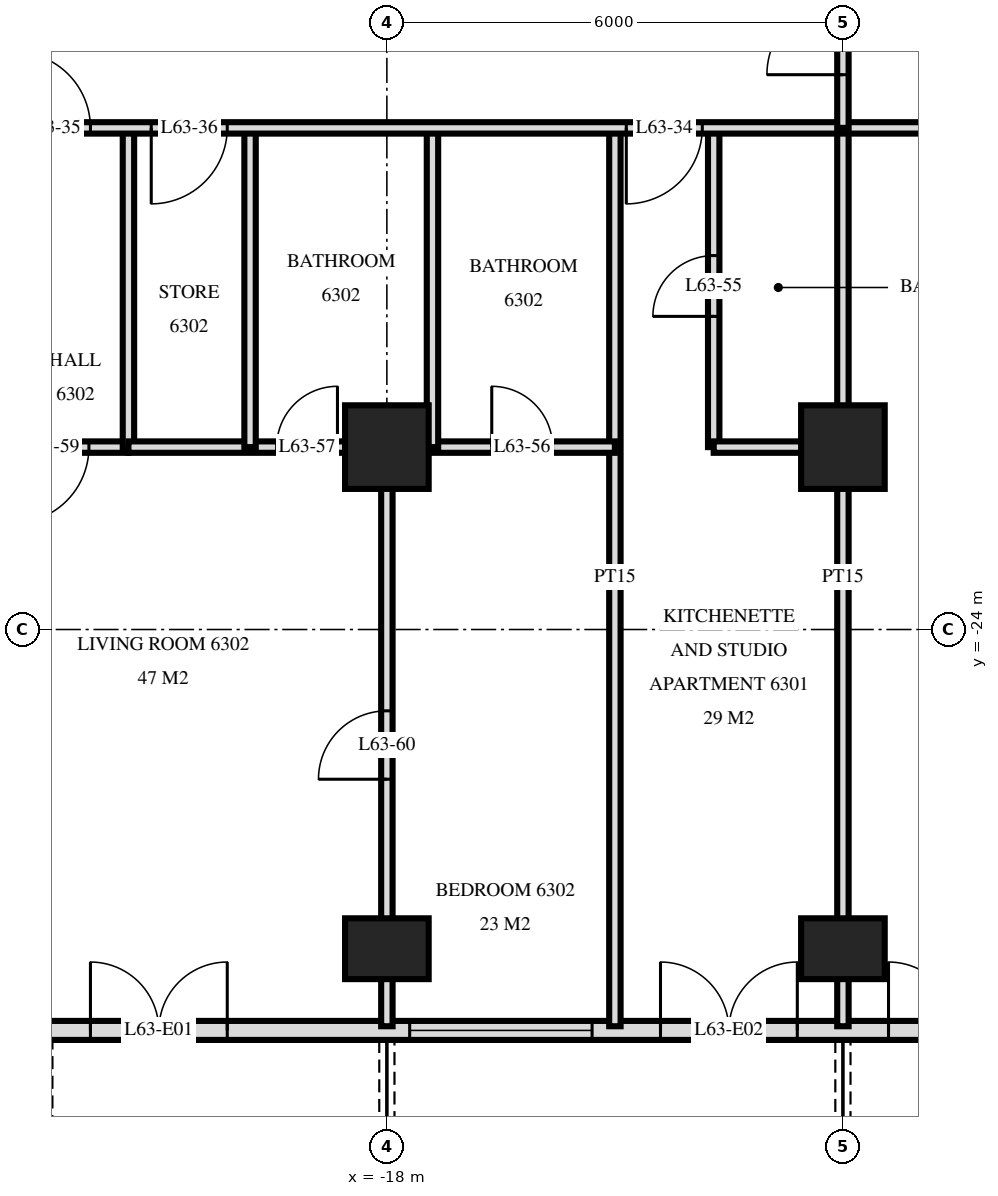
"""IFC4 building model, lengths in metres.
Left out: names, types, materials, properties, quantities, classifications, styles, units other than length and angle.
Written with IfcOpenShell. Run it as: python <this file> out.ifc"""

import sys

from ifc_helpers import new_model, si_unit, direction, frame, frame_2d, origin, origin_2d, place, context, subcontext, project, spatial, rectangle, extrude, element, fill, save


model = new_model("IFC4")
c1 = context("Model", 3, precision=1e-05, world=origin(), true_north=direction((0.0, 1.0)))
c2 = subcontext(c1, "Body", "Model", "MODEL_VIEW")
j1 = project(units=[si_unit("LENGTHUNIT", "METRE"), si_unit("PLANEANGLEUNIT", "RADIAN")], contexts=[c1])
p1 = place(None, origin())
s1 = spatial("IfcSite", under=j1, at=p1, CompositionType="ELEMENT")
p2 = place(p1, origin())
s2 = spatial("IfcBuilding", under=s1, at=p2, CompositionType="ELEMENT")
p3 = place(p2, frame((0.0, 0.0, 239.6)))
s3 = spatial("IfcBuildingStorey", under=s2, at=p3, CompositionType="ELEMENT", Elevation=239.6)
p4 = place(p3, frame((-18.0, -28.2, 0.0), z_axis=(0.0, 0.0, 1.0), x_axis=(1.0, 0.0, 0.0)))
e1 = element("IfcColumn", 1, at=p4, inside=s3, PredefinedType="COLUMN", context=c2, shape_type="SweptSolid", body=[
    extrude(rectangle(XDim=1.1, YDim=0.8, at=origin_2d()), origin(), (0.0, 0.0, 1.0), 3.5),
])
p5 = place(p3, frame((-18.0, -21.6, 0.0), z_axis=(0.0, 0.0, 1.0), x_axis=(1.0, 0.0, 0.0)))
e2 = element("IfcColumn", 2, at=p5, inside=s3, PredefinedType="COLUMN", context=c2, shape_type="SweptSolid", body=[
    extrude(rectangle(XDim=1.1, YDim=1.1, at=origin_2d()), origin(), (0.0, 0.0, 1.0), 3.5),
])
p6 = place(p3, frame((-12.0, -28.2, 0.0), z_axis=(0.0, 0.0, 1.0), x_axis=(1.0, 0.0, 0.0)))
e3 = element("IfcColumn", 3, at=p6, inside=s3, PredefinedType="COLUMN", context=c2, shape_type="SweptSolid", body=[
    extrude(rectangle(XDim=1.1, YDim=0.8, at=origin_2d()), origin(), (0.0, 0.0, 1.0), 3.5),
])
p7 = place(p3, frame((-12.0, -21.6, 0.0), z_axis=(0.0, 0.0, 1.0), x_axis=(1.0, 0.0, 0.0)))
e4 = element("IfcColumn", 4, at=p7, inside=s3, PredefinedType="COLUMN", context=c2, shape_type="SweptSolid", body=[
    extrude(rectangle(XDim=1.1, YDim=1.1, at=origin_2d()), origin(), (0.0, 0.0, 1.0), 3.5),
])
p8 = place(p3, frame((-22.475, -29.275, 0.0), z_axis=(0.0, 0.0, 1.0), x_axis=(1.0, 0.0, 0.0)))
e5 = element("IfcWall", 5, at=p8, inside=s3, PredefinedType="SOLIDWALL", context=c2, shape_type="SweptSolid", body=[
    extrude(rectangle(XDim=44.951, YDim=0.25, at=frame_2d((22.475, 0.0))), origin(), (0.0, 0.0, 1.0), 3.22),
])
p9 = place(p8, frame((0.575, 0.0, 0.0)))
e6 = element("IfcOpeningElement", 6, at=p9, cuts=e5, PredefinedType="OPENING", context=c2, shape_type="SweptSolid", body=[
    extrude(rectangle(XDim=1.8, YDim=2.4, at=frame_2d((0.9, 1.2))), frame((0.0, 0.135, 0.0), z_axis=(0.0, -1.0, 0.0), x_axis=(1.0, 0.0, 0.0)), (0.0, 0.0, 1.0), 0.27),
])
p10 = place(p8, frame((4.775, 0.0, 0.9)))
e7 = element("IfcOpeningElement", 7, at=p10, cuts=e5, PredefinedType="OPENING", context=c2, shape_type="SweptSolid", body=[
    extrude(rectangle(XDim=2.4, YDim=1.5, at=frame_2d((1.2, 0.75))), frame((0.0, 0.135, 0.0), z_axis=(0.0, -1.0, 0.0), x_axis=(1.0, 0.0, 0.0)), (0.0, 0.0, 1.0), 0.27),
])
p11 = place(p8, frame((8.075, 0.0, 0.0)))
e8 = element("IfcOpeningElement", 8, at=p11, cuts=e5, PredefinedType="OPENING", context=c2, shape_type="SweptSolid", body=[
    extrude(rectangle(XDim=1.8, YDim=2.4, at=frame_2d((0.9, 1.2))), frame((0.0, 0.135, 0.0), z_axis=(0.0, -1.0, 0.0), x_axis=(1.0, 0.0, 0.0)), (0.0, 0.0, 1.0), 0.27),
])
p12 = place(p8, frame((11.075, 0.0, 0.0)))
e9 = element("IfcOpeningElement", 9, at=p12, cuts=e5, PredefinedType="OPENING", context=c2, shape_type="SweptSolid", body=[
    extrude(rectangle(XDim=1.8, YDim=2.4, at=frame_2d((0.9, 1.2))), frame((0.0, 0.135, 0.0), z_axis=(0.0, -1.0, 0.0), x_axis=(1.0, 0.0, 0.0)), (0.0, 0.0, 1.0), 0.27),
])
p13 = place(p8, frame((13.775, 0.0, 0.9)))
e10 = element("IfcOpeningElement", 10, at=p13, cuts=e5, PredefinedType="OPENING", context=c2, shape_type="SweptSolid", body=[
    extrude(rectangle(XDim=2.4, YDim=1.5, at=frame_2d((1.2, 0.75))), frame((0.0, 0.135, 0.0), z_axis=(0.0, -1.0, 0.0), x_axis=(1.0, 0.0, 0.0)), (0.0, 0.0, 1.0), 0.27),
])
p14 = place(p8, frame((16.775, 0.0, 0.9)))
e11 = element("IfcOpeningElement", 11, at=p14, cuts=e5, PredefinedType="OPENING", context=c2, shape_type="SweptSolid", body=[
    extrude(rectangle(XDim=2.4, YDim=1.5, at=frame_2d((1.2, 0.75))), frame((0.0, 0.135, 0.0), z_axis=(0.0, -1.0, 0.0), x_axis=(1.0, 0.0, 0.0)), (0.0, 0.0, 1.0), 0.27),
])
p15 = place(p8, frame((20.075, 0.0, 0.0)))
e12 = element("IfcOpeningElement", 12, at=p15, cuts=e5, PredefinedType="OPENING", context=c2, shape_type="SweptSolid", body=[
    extrude(rectangle(XDim=1.8, YDim=2.4, at=frame_2d((0.9, 1.2))), frame((0.0, 0.135, 0.0), z_axis=(0.0, -1.0, 0.0), x_axis=(1.0, 0.0, 0.0)), (0.0, 0.0, 1.0), 0.27),
])
p16 = place(p8, frame((23.075, 0.0, 0.0)))
e13 = element("IfcOpeningElement", 13, at=p16, cuts=e5, PredefinedType="OPENING", context=c2, shape_type="SweptSolid", body=[
    extrude(rectangle(XDim=1.8, YDim=2.4, at=frame_2d((0.9, 1.2))), frame((0.0, 0.135, 0.0), z_axis=(0.0, -1.0, 0.0), x_axis=(1.0, 0.0, 0.0)), (0.0, 0.0, 1.0), 0.27),
])
p17 = place(p8, frame((25.775, 0.0, 0.9)))
e14 = element("IfcOpeningElement", 14, at=p17, cuts=e5, PredefinedType="OPENING", context=c2, shape_type="SweptSolid", body=[
    extrude(rectangle(XDim=2.4, YDim=1.5, at=frame_2d((1.2, 0.75))), frame((0.0, 0.135, 0.0), z_axis=(0.0, -1.0, 0.0), x_axis=(1.0, 0.0, 0.0)), (0.0, 0.0, 1.0), 0.27),
])
p18 = place(p8, frame((29.075, 0.0, 0.0)))
e15 = element("IfcOpeningElement", 15, at=p18, cuts=e5, PredefinedType="OPENING", context=c2, shape_type="SweptSolid", body=[
    extrude(rectangle(XDim=1.8, YDim=2.4, at=frame_2d((0.9, 1.2))), frame((0.0, 0.135, 0.0), z_axis=(0.0, -1.0, 0.0), x_axis=(1.0, 0.0, 0.0)), (0.0, 0.0, 1.0), 0.27),
])
p19 = place(p8, frame((31.775, 0.0, 0.9)))
e16 = element("IfcOpeningElement", 16, at=p19, cuts=e5, PredefinedType="OPENING", context=c2, shape_type="SweptSolid", body=[
    extrude(rectangle(XDim=2.4, YDim=1.5, at=frame_2d((1.2, 0.75))), frame((0.0, 0.135, 0.0), z_axis=(0.0, -1.0, 0.0), x_axis=(1.0, 0.0, 0.0)), (0.0, 0.0, 1.0), 0.27),
])
p20 = place(p8, frame((35.075, 0.0, 0.0)))
e17 = element("IfcOpeningElement", 17, at=p20, cuts=e5, PredefinedType="OPENING", context=c2, shape_type="SweptSolid", body=[
    extrude(rectangle(XDim=1.8, YDim=2.4, at=frame_2d((0.9, 1.2))), frame((0.0, 0.135, 0.0), z_axis=(0.0, -1.0, 0.0), x_axis=(1.0, 0.0, 0.0)), (0.0, 0.0, 1.0), 0.27),
])
p21 = place(p8, frame((41.075, 0.0, 0.0)))
e18 = element("IfcOpeningElement", 18, at=p21, cuts=e5, PredefinedType="OPENING", context=c2, shape_type="SweptSolid", body=[
    extrude(rectangle(XDim=1.8, YDim=2.4, at=frame_2d((0.9, 1.2))), frame((0.0, 0.135, 0.0), z_axis=(0.0, -1.0, 0.0), x_axis=(1.0, 0.0, 0.0)), (0.0, 0.0, 1.0), 0.27),
])
p22 = place(p3, frame((-12.0, -17.4, 0.0), z_axis=(0.0, 0.0, 1.0), x_axis=(0.0, 1.0, 0.0)))
e19 = element("IfcWall", 19, at=p22, inside=s3, PredefinedType="PARTITIONING", context=c2, shape_type="SweptSolid", body=[
    extrude(rectangle(XDim=2.35, YDim=0.15, at=frame_2d((1.175, 0.0))), origin(), (0.0, 0.0, 1.0), 3.22),
])
p23 = place(p22, frame((0.7, 0.0, 0.0)))
e20 = element("IfcOpeningElement", 20, at=p23, cuts=e19, PredefinedType="OPENING", context=c2, shape_type="SweptSolid", body=[
    extrude(rectangle(XDim=1.0, YDim=2.1, at=frame_2d((0.5, 1.05))), frame((0.0, 0.085, 0.0), z_axis=(0.0, -1.0, 0.0), x_axis=(1.0, 0.0, 0.0)), (0.0, 0.0, 1.0), 0.17),
])
p24 = place(p3, frame((-12.0, -29.22, 0.0), z_axis=(0.0, 0.0, 1.0), x_axis=(0.0, 1.0, 0.0)))
e21 = element("IfcWall", 21, at=p24, inside=s3, PredefinedType="PARTITIONING", context=c2, shape_type="SweptSolid", body=[
    extrude(rectangle(XDim=11.82, YDim=0.15, at=frame_2d((5.91, 0.0))), origin(), (0.0, 0.0, 1.0), 3.22),
])
p25 = place(p3, frame((-13.7, -21.6, 0.0), z_axis=(0.0, 0.0, 1.0), x_axis=(0.0, 1.0, 0.0)))
e22 = element("IfcWall", 22, at=p25, inside=s3, PredefinedType="PARTITIONING", context=c2, shape_type="SweptSolid", body=[
    extrude(rectangle(XDim=4.2, YDim=0.15, at=frame_2d((2.1, 0.0))), origin(), (0.0, 0.0, 1.0), 3.22),
])
p26 = place(p25, frame((1.72, 0.0, 0.0)))
e23 = element("IfcOpeningElement", 23, at=p26, cuts=e22, PredefinedType="OPENING", context=c2, shape_type="SweptSolid", body=[
    extrude(rectangle(XDim=0.8, YDim=2.1, at=frame_2d((0.4, 1.05))), frame((0.0, 0.085, 0.0), z_axis=(0.0, -1.0, 0.0), x_axis=(1.0, 0.0, 0.0)), (0.0, 0.0, 1.0), 0.17),
])
p27 = place(p3, frame((-15.0, -29.22, 0.0), z_axis=(0.0, 0.0, 1.0), x_axis=(0.0, 1.0, 0.0)))
e24 = element("IfcWall", 24, at=p27, inside=s3, PredefinedType="PARTITIONING", context=c2, shape_type="SweptSolid", body=[
    extrude(rectangle(XDim=11.82, YDim=0.15, at=frame_2d((5.91, 0.0))), origin(), (0.0, 0.0, 1.0), 3.22),
])
p28 = place(p3, frame((-17.4, -21.6, 0.0), z_axis=(0.0, 0.0, 1.0), x_axis=(0.0, 1.0, 0.0)))
e25 = element("IfcWall", 25, at=p28, inside=s3, PredefinedType="PARTITIONING", context=c2, shape_type="SweptSolid", body=[
    extrude(rectangle(XDim=4.2, YDim=0.15, at=frame_2d((2.1, 0.0))), origin(), (0.0, 0.0, 1.0), 3.22),
])
p29 = place(p3, frame((-18.0, -29.22, 0.0), z_axis=(0.0, 0.0, 1.0), x_axis=(0.0, 1.0, 0.0)))
e26 = element("IfcWall", 26, at=p29, inside=s3, PredefinedType="PARTITIONING", context=c2, shape_type="SweptSolid", body=[
    extrude(rectangle(XDim=7.62, YDim=0.15, at=frame_2d((3.81, 0.0))), origin(), (0.0, 0.0, 1.0), 3.22),
])
p30 = place(p29, frame((3.25, 0.0, 0.0)))
e27 = element("IfcOpeningElement", 27, at=p30, cuts=e26, PredefinedType="OPENING", context=c2, shape_type="SweptSolid", body=[
    extrude(rectangle(XDim=0.9, YDim=2.1, at=frame_2d((0.45, 1.05))), frame((0.0, 0.085, 0.0), z_axis=(0.0, -1.0, 0.0), x_axis=(1.0, 0.0, 0.0)), (0.0, 0.0, 1.0), 0.17),
])
for number, where, z_axis, x_axis in (
    (28, (-19.8, -21.6, 0.0), (0.0, 0.0, 1.0), (0.0, 1.0, 0.0)),
    (29, (-21.4, -21.6, 0.0), (0.0, 0.0, 1.0), (0.0, 1.0, 0.0)),
):
    element("IfcWall", number, at=place(p3, frame(where, z_axis=z_axis, x_axis=x_axis)), inside=s3, PredefinedType="PARTITIONING", context=c2, shape_type="SweptSolid", body=[
        extrude(rectangle(XDim=4.2, YDim=0.15, at=frame_2d((2.1, 0.0))), origin(), (0.0, 0.0, 1.0), 3.22),
    ])
p31 = place(p3, frame((-23.4, -21.6, 0.0), z_axis=(0.0, 0.0, 1.0), x_axis=(1.0, 0.0, 0.0)))
e30 = element("IfcWall", 30, at=p31, inside=s3, PredefinedType="PARTITIONING", context=c2, shape_type="SweptSolid", body=[
    extrude(rectangle(XDim=2.0, YDim=0.15, at=frame_2d((1.0, 0.0))), origin(), (0.0, 0.0, 1.0), 3.22),
])
p32 = place(p31, frame((0.48, 0.0, 0.0)))
e31 = element("IfcOpeningElement", 31, at=p32, cuts=e30, PredefinedType="OPENING", context=c2, shape_type="SweptSolid", body=[
    extrude(rectangle(XDim=1.0, YDim=2.1, at=frame_2d((0.5, 1.05))), frame((0.0, 0.085, 0.0), z_axis=(0.0, -1.0, 0.0), x_axis=(1.0, 0.0, 0.0)), (0.0, 0.0, 1.0), 0.17),
])
p33 = place(p3, frame((-21.4, -21.6, 0.0), z_axis=(0.0, 0.0, 1.0), x_axis=(1.0, 0.0, 0.0)))
e32 = element("IfcWall", 32, at=p33, inside=s3, PredefinedType="PARTITIONING", context=c2, shape_type="SweptSolid", body=[
    extrude(rectangle(XDim=6.4, YDim=0.15, at=frame_2d((3.2, 0.0))), origin(), (0.0, 0.0, 1.0), 3.22),
])
p34 = place(p33, frame((4.78, 0.0, 0.0)))
e33 = element("IfcOpeningElement", 33, at=p34, cuts=e32, PredefinedType="OPENING", context=c2, shape_type="SweptSolid", body=[
    extrude(rectangle(XDim=0.8, YDim=2.1, at=frame_2d((0.4, 1.05))), frame((0.0, 0.085, 0.0), z_axis=(0.0, -1.0, 0.0), x_axis=(1.0, 0.0, 0.0)), (0.0, 0.0, 1.0), 0.17),
])
p35 = place(p33, frame((1.95, 0.0, 0.0)))
e34 = element("IfcOpeningElement", 34, at=p35, cuts=e32, PredefinedType="OPENING", context=c2, shape_type="SweptSolid", body=[
    extrude(rectangle(XDim=0.8, YDim=2.1, at=frame_2d((0.4, 1.05))), frame((0.0, 0.085, 0.0), z_axis=(0.0, -1.0, 0.0), x_axis=(1.0, 0.0, 0.0)), (0.0, 0.0, 1.0), 0.17),
])
p36 = place(p3, frame((-13.7, -21.6, 0.0), z_axis=(0.0, 0.0, 1.0), x_axis=(1.0, 0.0, 0.0)))
e35 = element("IfcWall", 35, at=p36, inside=s3, PredefinedType="PARTITIONING", context=c2, shape_type="SweptSolid", body=[
    extrude(rectangle(XDim=1.7, YDim=0.15, at=frame_2d((0.85, 0.0))), origin(), (0.0, 0.0, 1.0), 3.22),
])
p37 = place(p3, frame((-26.82, -17.4, 0.0), z_axis=(0.0, 0.0, 1.0), x_axis=(1.0, 0.0, 0.0)))
e36 = element("IfcWall", 36, at=p37, inside=s3, PredefinedType="PARTITIONING", context=c2, shape_type="SweptSolid", body=[
    extrude(rectangle(XDim=53.64, YDim=0.15, at=frame_2d((26.82, 0.0))), origin(), (0.0, 0.0, 1.0), 3.22),
])
p38 = place(p37, frame((11.97, 0.0, 0.0)))
e37 = element("IfcOpeningElement", 37, at=p38, cuts=e36, PredefinedType="OPENING", context=c2, shape_type="SweptSolid", body=[
    extrude(rectangle(XDim=1.0, YDim=2.1, at=frame_2d((0.5, 1.05))), frame((0.0, 0.085, 0.0), z_axis=(0.0, -1.0, 0.0), x_axis=(1.0, 0.0, 0.0)), (0.0, 0.0, 1.0), 0.17),
])
p39 = place(p37, frame((3.92, 0.0, 0.0)))
e38 = element("IfcOpeningElement", 38, at=p39, cuts=e36, PredefinedType="OPENING", context=c2, shape_type="SweptSolid", body=[
    extrude(rectangle(XDim=1.0, YDim=2.1, at=frame_2d((0.5, 1.05))), frame((0.0, 0.085, 0.0), z_axis=(0.0, -1.0, 0.0), x_axis=(1.0, 0.0, 0.0)), (0.0, 0.0, 1.0), 0.17),
])
p40 = place(p37, frame((5.72, 0.0, 0.0)))
e39 = element("IfcOpeningElement", 39, at=p40, cuts=e36, PredefinedType="OPENING", context=c2, shape_type="SweptSolid", body=[
    extrude(rectangle(XDim=1.0, YDim=2.1, at=frame_2d((0.5, 1.05))), frame((0.0, 0.085, 0.0), z_axis=(0.0, -1.0, 0.0), x_axis=(1.0, 0.0, 0.0)), (0.0, 0.0, 1.0), 0.17),
])
p41 = place(p37, frame((47.72, 0.0, 0.0)))
e40 = element("IfcOpeningElement", 40, at=p41, cuts=e36, PredefinedType="OPENING", context=c2, shape_type="SweptSolid", body=[
    extrude(rectangle(XDim=1.0, YDim=2.1, at=frame_2d((0.5, 1.05))), frame((0.0, 0.085, 0.0), z_axis=(0.0, -1.0, 0.0), x_axis=(1.0, 0.0, 0.0)), (0.0, 0.0, 1.0), 0.17),
])
p42 = place(p37, frame((51.02, 0.0, 0.0)))
e41 = element("IfcOpeningElement", 41, at=p42, cuts=e36, PredefinedType="OPENING", context=c2, shape_type="SweptSolid", body=[
    extrude(rectangle(XDim=1.0, YDim=2.1, at=frame_2d((0.5, 1.05))), frame((0.0, 0.085, 0.0), z_axis=(0.0, -1.0, 0.0), x_axis=(1.0, 0.0, 0.0)), (0.0, 0.0, 1.0), 0.17),
])
p43 = place(p37, frame((17.32, 0.0, 0.0)))
e42 = element("IfcOpeningElement", 42, at=p43, cuts=e36, PredefinedType="OPENING", context=c2, shape_type="SweptSolid", body=[
    extrude(rectangle(XDim=1.0, YDim=2.1, at=frame_2d((0.5, 1.05))), frame((0.0, 0.085, 0.0), z_axis=(0.0, -1.0, 0.0), x_axis=(1.0, 0.0, 0.0)), (0.0, 0.0, 1.0), 0.17),
])
p44 = place(p37, frame((23.32, 0.0, 0.0)))
e43 = element("IfcOpeningElement", 43, at=p44, cuts=e36, PredefinedType="OPENING", context=c2, shape_type="SweptSolid", body=[
    extrude(rectangle(XDim=1.0, YDim=2.1, at=frame_2d((0.5, 1.05))), frame((0.0, 0.085, 0.0), z_axis=(0.0, -1.0, 0.0), x_axis=(1.0, 0.0, 0.0)), (0.0, 0.0, 1.0), 0.17),
])
p45 = place(p37, frame((29.32, 0.0, 0.0)))
e44 = element("IfcOpeningElement", 44, at=p45, cuts=e36, PredefinedType="OPENING", context=c2, shape_type="SweptSolid", body=[
    extrude(rectangle(XDim=1.0, YDim=2.1, at=frame_2d((0.5, 1.05))), frame((0.0, 0.085, 0.0), z_axis=(0.0, -1.0, 0.0), x_axis=(1.0, 0.0, 0.0)), (0.0, 0.0, 1.0), 0.17),
])
p46 = place(p37, frame((35.32, 0.0, 0.0)))
e45 = element("IfcOpeningElement", 45, at=p46, cuts=e36, PredefinedType="OPENING", context=c2, shape_type="SweptSolid", body=[
    extrude(rectangle(XDim=1.0, YDim=2.1, at=frame_2d((0.5, 1.05))), frame((0.0, 0.085, 0.0), z_axis=(0.0, -1.0, 0.0), x_axis=(1.0, 0.0, 0.0)), (0.0, 0.0, 1.0), 0.17),
])
p47 = place(p9, origin())
e46 = element("IfcDoor", 46, at=p47, inside=s3, OperationType="DOUBLE_DOOR_SINGLE_SWING", PredefinedType="DOOR", context=c2, shape_type="SweptSolid", body=[
    extrude(rectangle(XDim=1.8, YDim=2.4, at=frame_2d((0.9, 1.2))), frame((0.0, 0.025, 0.0), z_axis=(0.0, -1.0, 0.0), x_axis=(1.0, 0.0, 0.0)), (0.0, 0.0, 1.0), 0.05),
])
fill(e6, e46)
p48 = place(p10, origin())
e47 = element("IfcWindow", 47, at=p48, inside=s3, PartitioningType="SINGLE_PANEL", PredefinedType="WINDOW", context=c2, shape_type="SweptSolid", body=[
    extrude(rectangle(XDim=2.4, YDim=1.5, at=frame_2d((1.2, 0.75))), frame((0.0, 0.03, 0.0), z_axis=(0.0, -1.0, 0.0), x_axis=(1.0, 0.0, 0.0)), (0.0, 0.0, 1.0), 0.06),
])
fill(e7, e47)
p49 = place(p11, origin())
e48 = element("IfcDoor", 48, at=p49, inside=s3, OperationType="DOUBLE_DOOR_SINGLE_SWING", PredefinedType="DOOR", context=c2, shape_type="SweptSolid", body=[
    extrude(rectangle(XDim=1.8, YDim=2.4, at=frame_2d((0.9, 1.2))), frame((0.0, 0.025, 0.0), z_axis=(0.0, -1.0, 0.0), x_axis=(1.0, 0.0, 0.0)), (0.0, 0.0, 1.0), 0.05),
])
fill(e8, e48)
p50 = place(p12, origin())
e49 = element("IfcDoor", 49, at=p50, inside=s3, OperationType="DOUBLE_DOOR_SINGLE_SWING", PredefinedType="DOOR", context=c2, shape_type="SweptSolid", body=[
    extrude(rectangle(XDim=1.8, YDim=2.4, at=frame_2d((0.9, 1.2))), frame((0.0, 0.025, 0.0), z_axis=(0.0, -1.0, 0.0), x_axis=(1.0, 0.0, 0.0)), (0.0, 0.0, 1.0), 0.05),
])
fill(e9, e49)
p51 = place(p23, origin())
e50 = element("IfcDoor", 50, at=p51, inside=s3, OperationType="SINGLE_SWING_RIGHT", PredefinedType="DOOR", context=c2, shape_type="SweptSolid", body=[
    extrude(rectangle(XDim=1.0, YDim=2.1, at=frame_2d((0.5, 1.05))), frame((0.0, 0.025, 0.0), z_axis=(0.0, -1.0, 0.0), x_axis=(1.0, 0.0, 0.0)), (0.0, 0.0, 1.0), 0.05),
])
fill(e20, e50)
p52 = place(p38, frame((0.5, 0.0, 0.0), z_axis=(0.0, 0.0, 1.0), x_axis=(-1.0, 0.0, 0.0)))
e51 = element("IfcDoor", 51, at=p52, inside=s3, OperationType="SINGLE_SWING_LEFT", PredefinedType="DOOR", context=c2, shape_type="SweptSolid", body=[
    extrude(rectangle(XDim=1.0, YDim=2.1, at=frame_2d((0.0, 1.05))), frame((0.0, -0.025, 0.0), z_axis=(0.0, 1.0, 0.0), x_axis=(-1.0, 0.0, 0.0)), (0.0, 0.0, 1.0), 0.05),
])
fill(e37, e51)
p53 = place(p39, origin())
e52 = element("IfcDoor", 52, at=p53, inside=s3, OperationType="SINGLE_SWING_RIGHT", PredefinedType="DOOR", context=c2, shape_type="SweptSolid", body=[
    extrude(rectangle(XDim=1.0, YDim=2.1, at=frame_2d((0.5, 1.05))), frame((0.0, 0.025, 0.0), z_axis=(0.0, -1.0, 0.0), x_axis=(1.0, 0.0, 0.0)), (0.0, 0.0, 1.0), 0.05),
])
fill(e38, e52)
p54 = place(p40, frame((0.5, 0.0, 0.0), z_axis=(0.0, 0.0, 1.0), x_axis=(-1.0, 0.0, 0.0)))
e53 = element("IfcDoor", 53, at=p54, inside=s3, OperationType="SINGLE_SWING_LEFT", PredefinedType="DOOR", context=c2, shape_type="SweptSolid", body=[
    extrude(rectangle(XDim=1.0, YDim=2.1, at=frame_2d((0.0, 1.05))), frame((0.0, -0.025, 0.0), z_axis=(0.0, 1.0, 0.0), x_axis=(-1.0, 0.0, 0.0)), (0.0, 0.0, 1.0), 0.05),
])
fill(e39, e53)
p55 = place(p26, origin())
e54 = element("IfcDoor", 54, at=p55, inside=s3, OperationType="SINGLE_SWING_RIGHT", PredefinedType="DOOR", context=c2, shape_type="SweptSolid", body=[
    extrude(rectangle(XDim=0.8, YDim=2.1, at=frame_2d((0.4, 1.05))), frame((0.0, 0.025, 0.0), z_axis=(0.0, -1.0, 0.0), x_axis=(1.0, 0.0, 0.0)), (0.0, 0.0, 1.0), 0.05),
])
fill(e23, e54)
p56 = place(p34, origin())
e55 = element("IfcDoor", 55, at=p56, inside=s3, OperationType="SINGLE_SWING_RIGHT", PredefinedType="DOOR", context=c2, shape_type="SweptSolid", body=[
    extrude(rectangle(XDim=0.8, YDim=2.1, at=frame_2d((0.4, 1.05))), frame((0.0, 0.025, 0.0), z_axis=(0.0, -1.0, 0.0), x_axis=(1.0, 0.0, 0.0)), (0.0, 0.0, 1.0), 0.05),
])
fill(e33, e55)
p57 = place(p35, origin())
e56 = element("IfcDoor", 56, at=p57, inside=s3, OperationType="SINGLE_SWING_LEFT", PredefinedType="DOOR", context=c2, shape_type="SweptSolid", body=[
    extrude(rectangle(XDim=0.8, YDim=2.1, at=frame_2d((0.4, 1.05))), frame((0.0, 0.025, 0.0), z_axis=(0.0, -1.0, 0.0), x_axis=(1.0, 0.0, 0.0)), (0.0, 0.0, 1.0), 0.05),
])
fill(e34, e56)
p58 = place(p32, frame((0.5, 0.0, 0.0), z_axis=(0.0, 0.0, 1.0), x_axis=(-1.0, 0.0, 0.0)))
e57 = element("IfcDoor", 57, at=p58, inside=s3, OperationType="SINGLE_SWING_LEFT", PredefinedType="DOOR", context=c2, shape_type="SweptSolid", body=[
    extrude(rectangle(XDim=1.0, YDim=2.1, at=frame_2d((0.0, 1.05))), frame((0.0, -0.025, 0.0), z_axis=(0.0, 1.0, 0.0), x_axis=(-1.0, 0.0, 0.0)), (0.0, 0.0, 1.0), 0.05),
])
fill(e31, e57)
p59 = place(p30, origin())
e58 = element("IfcDoor", 58, at=p59, inside=s3, OperationType="SINGLE_SWING_RIGHT", PredefinedType="DOOR", context=c2, shape_type="SweptSolid", body=[
    extrude(rectangle(XDim=0.9, YDim=2.1, at=frame_2d((0.45, 1.05))), frame((0.0, 0.025, 0.0), z_axis=(0.0, -1.0, 0.0), x_axis=(1.0, 0.0, 0.0)), (0.0, 0.0, 1.0), 0.05),
])
fill(e27, e58)
save(model, sys.argv[1])
